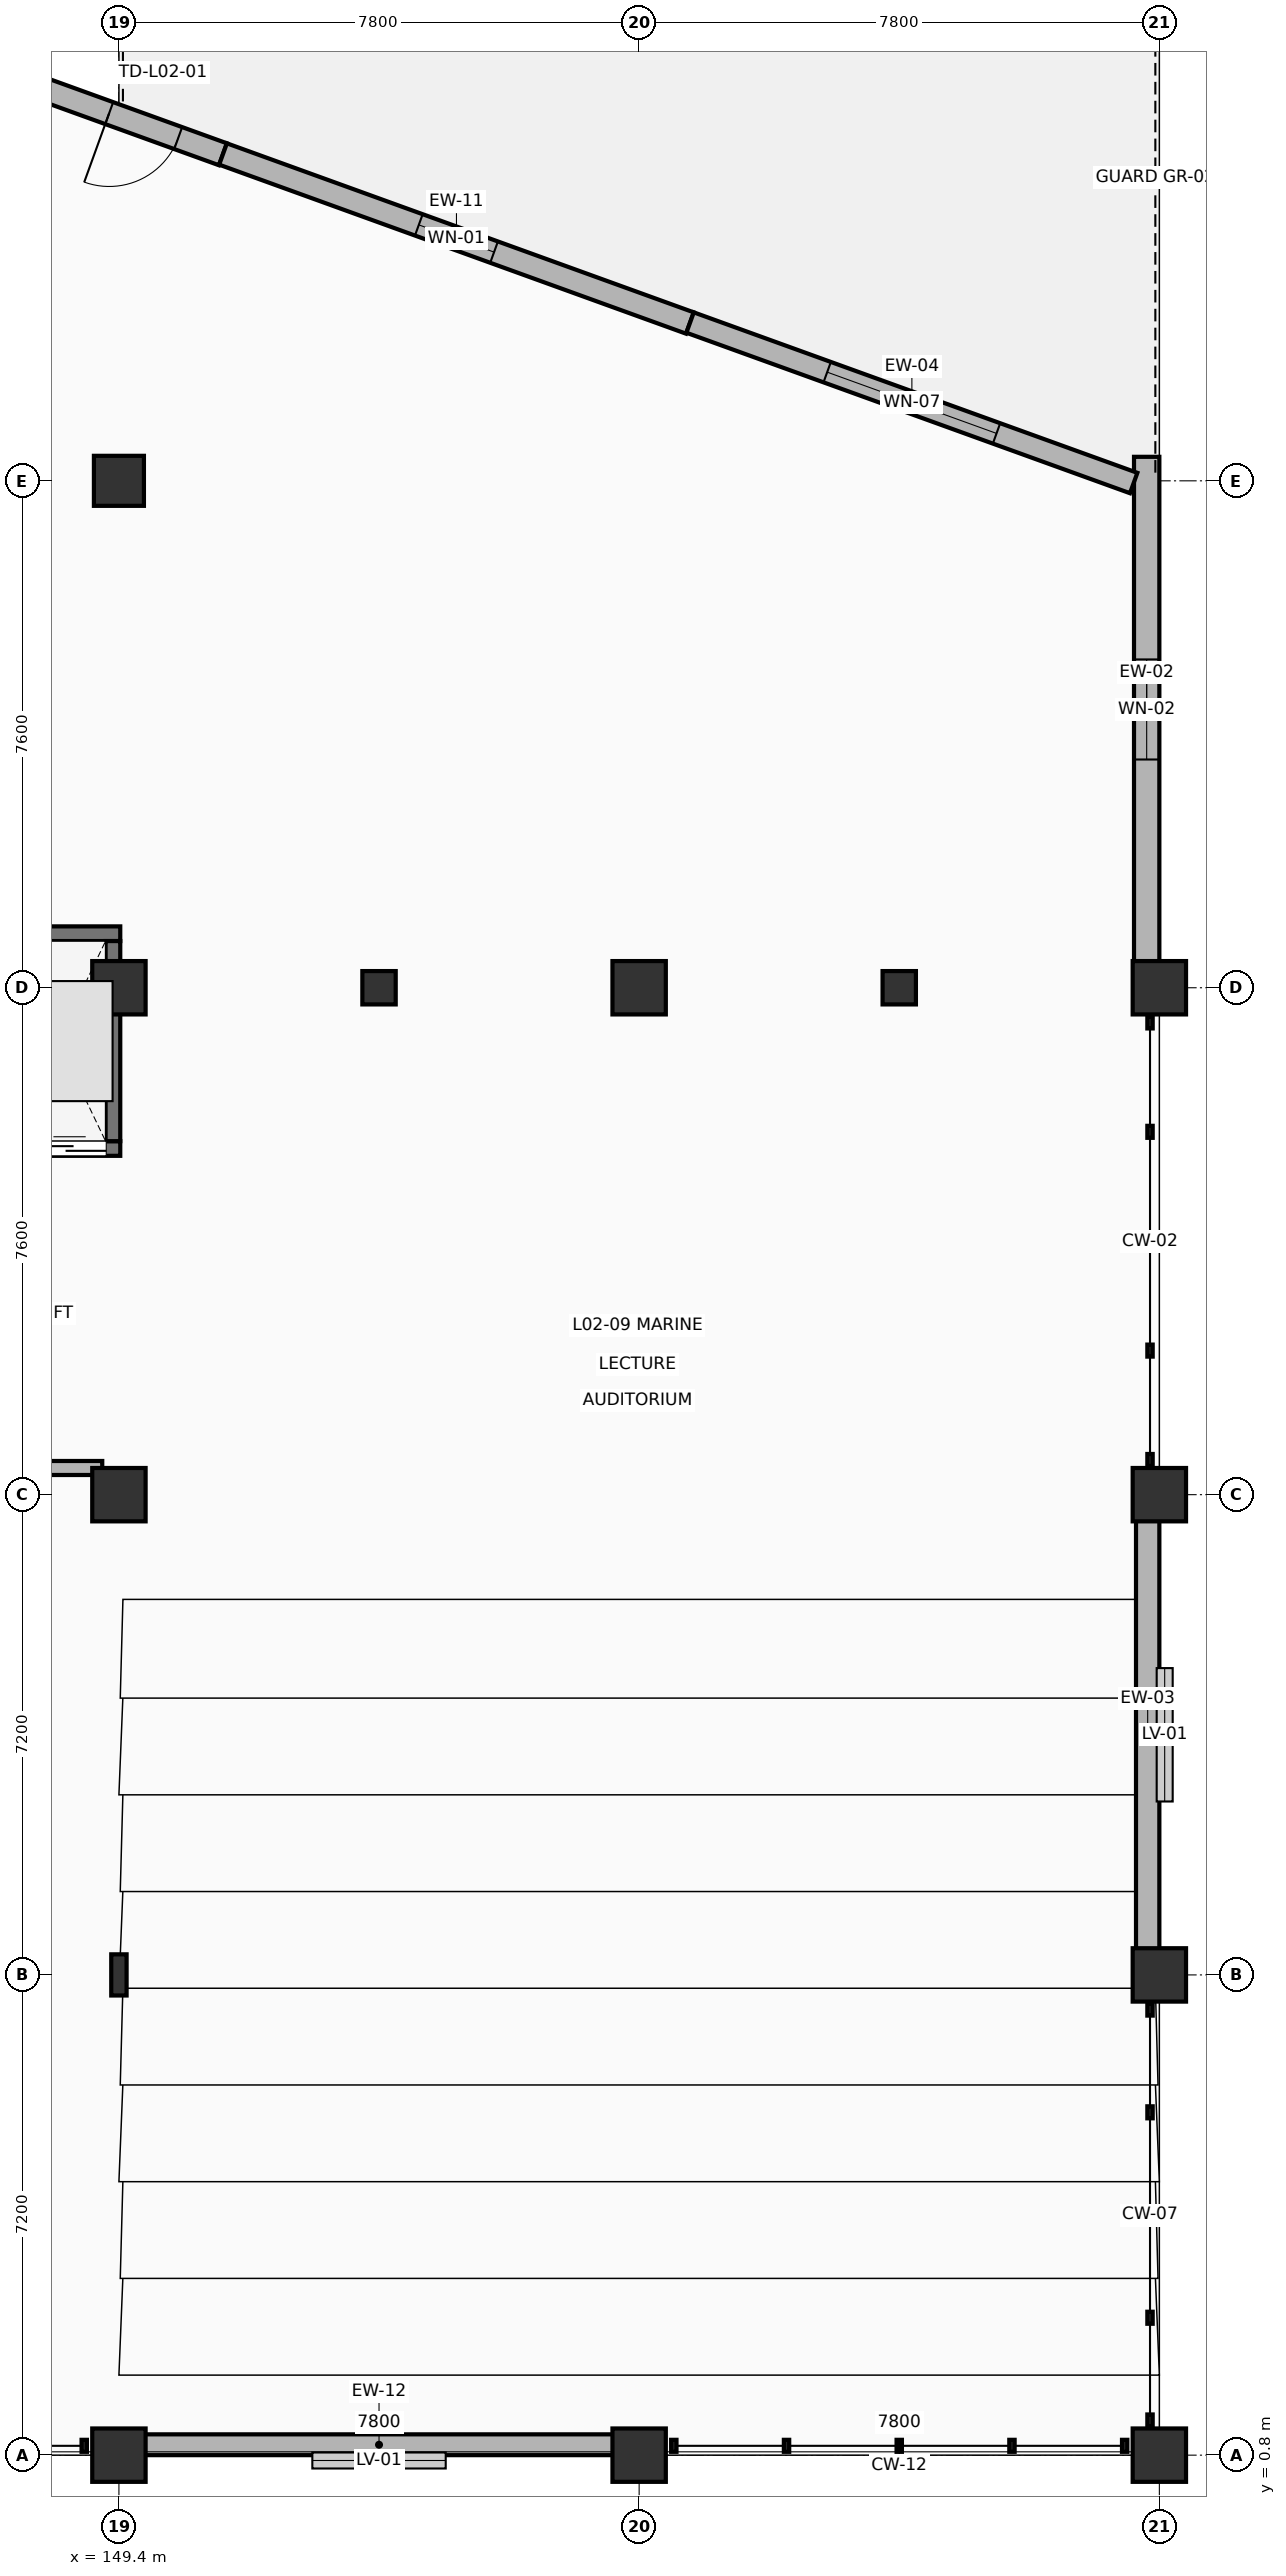
"""IFC4 building model, lengths in metres.
Left out: names, types, materials, properties, quantities, classifications, styles, units other than length and angle.
Written with IfcOpenShell. Run it as: python <this file> out.ifc"""

import sys

from ifc_helpers import new_model, si_unit, direction, frame, frame_2d, origin, origin_2d, place, context, subcontext, project, spatial, rectangle, circle, i_section, extrude, element, fill, save


model = new_model("IFC4")
c1 = context("Model", 3, precision=1e-05, world=origin(), true_north=direction((0.0, 1.0)))
c2 = subcontext(c1, "Body", "Model", "MODEL_VIEW")
j1 = project(units=[si_unit("LENGTHUNIT", "METRE"), si_unit("PLANEANGLEUNIT", "RADIAN")], contexts=[c1])
p1 = place(None, origin())
s1 = spatial("IfcSite", under=j1, at=p1, CompositionType="ELEMENT")
p2 = place(p1, origin())
s2 = spatial("IfcBuilding", under=s1, at=p2, CompositionType="ELEMENT")
p3 = place(p2, frame((0.0, 0.0, 5.4)))
s3 = spatial("IfcBuildingStorey", under=s2, at=p3, CompositionType="ELEMENT", Elevation=5.4)
p4 = place(p3, frame((149.4, 0.8, 0.0), z_axis=(0.0, 0.0, 1.0), x_axis=(1.0, 0.0, 0.0)))
e1 = element("IfcColumn", 1, at=p4, inside=s3, PredefinedType="COLUMN", context=c2, shape_type="SweptSolid", body=[
    extrude(rectangle(XDim=0.8, YDim=0.8, at=origin_2d()), origin(), (0.0, 0.0, 1.0), 4.84),
])
p5 = place(p3, frame((149.4, 8.0, 0.0), z_axis=(0.0, 0.0, 1.0), x_axis=(1.0, 0.0, 0.0)))
e2 = element("IfcColumn", 2, at=p5, inside=s3, PredefinedType="COLUMN", context=c2, shape_type="SweptSolid", body=[
    extrude(i_section(OverallWidth=0.23, OverallDepth=0.617, WebThickness=0.013, FlangeThickness=0.022, at=origin_2d()), origin(), (0.0, 0.0, 1.0), 5.1),
])
for number, where, z_axis, x_axis in (
    (3, (149.4, 15.2, 0.0), (0.0, 0.0, 1.0), (1.0, 0.0, 0.0)),
    (4, (149.4, 22.8, 0.0), (0.0, 0.0, 1.0), (1.0, 0.0, 0.0)),
):
    element("IfcColumn", number, at=place(p3, frame(where, z_axis=z_axis, x_axis=x_axis)), inside=s3, PredefinedType="COLUMN", context=c2, shape_type="SweptSolid", body=[
        extrude(rectangle(XDim=0.8, YDim=0.8, at=origin_2d()), origin(), (0.0, 0.0, 1.0), 5.1),
    ])
p6 = place(p3, frame((149.4, 30.4, 0.0), z_axis=(0.0, 0.0, 1.0), x_axis=(1.0, 0.0, 0.0)))
e5 = element("IfcColumn", 5, at=p6, inside=s3, PredefinedType="COLUMN", context=c2, shape_type="SweptSolid", body=[
    extrude(circle(Radius=0.375, at=origin_2d()), origin(), (0.0, 0.0, 1.0), 4.84),
])
for number, where, z_axis, x_axis in (
    (6, (157.2, 0.8, 0.0), (0.0, 0.0, 1.0), (1.0, 0.0, 0.0)),
    (7, (157.2, 22.8, 0.0), (0.0, 0.0, 1.0), (1.0, 0.0, 0.0)),
    (8, (165.0, 0.8, 0.0), (0.0, 0.0, 1.0), (1.0, 0.0, 0.0)),
    (9, (165.0, 8.0, 0.0), (0.0, 0.0, 1.0), (1.0, 0.0, 0.0)),
    (10, (165.0, 15.2, 0.0), (0.0, 0.0, 1.0), (1.0, 0.0, 0.0)),
    (11, (165.0, 22.8, 0.0), (0.0, 0.0, 1.0), (1.0, 0.0, 0.0)),
):
    element("IfcColumn", number, at=place(p3, frame(where, z_axis=z_axis, x_axis=x_axis)), inside=s3, PredefinedType="COLUMN", context=c2, shape_type="SweptSolid", body=[
        extrude(rectangle(XDim=0.8, YDim=0.8, at=origin_2d()), origin(), (0.0, 0.0, 1.0), 4.84),
    ])
for number, where, z_axis, x_axis in (
    (12, (153.3, 22.8, 0.0), (0.0, 0.0, 1.0), (1.0, 0.0, 0.0)),
    (13, (161.1, 22.8, 0.0), (0.0, 0.0, 1.0), (1.0, 0.0, 0.0)),
):
    element("IfcColumn", number, at=place(p3, frame(where, z_axis=z_axis, x_axis=x_axis)), inside=s3, PredefinedType="COLUMN", context=c2, shape_type="SweptSolid", body=[
        extrude(rectangle(XDim=0.5, YDim=0.5, at=origin_2d()), origin(), (0.0, 0.0, 1.0), 4.84),
    ])
p7 = place(p3, frame((164.81, 30.76, 0.0), z_axis=(0.0, 0.0, 1.0), x_axis=(0.0, -1.0, 0.0)))
e14 = element("IfcWall", 14, at=p7, inside=s3, PredefinedType="SOLIDWALL", context=c2, shape_type="SweptSolid", body=[
    extrude(rectangle(XDim=7.575, YDim=0.38, at=frame_2d((3.788, 0.0))), origin(), (0.0, 0.0, 1.0), 4.86),
])
p8 = place(p7, frame((3.038, 0.0, 0.95)))
e15 = element("IfcOpeningElement", 15, at=p8, cuts=e14, PredefinedType="OPENING", context=c2, shape_type="SweptSolid", body=[
    extrude(rectangle(XDim=1.5, YDim=1.8, at=frame_2d((0.75, 0.9))), frame((0.0, 0.2, 0.0), z_axis=(0.0, -1.0, 0.0), x_axis=(1.0, 0.0, 0.0)), (0.0, 0.0, 1.0), 0.4),
])
p9 = place(p3, frame((164.825, 14.815, 0.0), z_axis=(0.0, 0.0, 1.0), x_axis=(0.0, -1.0, 0.0)))
e16 = element("IfcWall", 16, at=p9, inside=s3, PredefinedType="SOLIDWALL", context=c2, shape_type="SweptSolid", body=[
    extrude(rectangle(XDim=6.43, YDim=0.35, at=frame_2d((3.215, 0.0))), origin(), (0.0, 0.0, 1.0), 4.84),
])
p10 = place(p3, frame((156.815, 0.956, 0.0), z_axis=(0.0, 0.0, 1.0), x_axis=(-1.0, 0.0, 0.0)))
e17 = element("IfcWall", 17, at=p10, inside=s3, PredefinedType="SOLIDWALL", context=c2, shape_type="SweptSolid", body=[
    extrude(rectangle(XDim=7.03, YDim=0.312, at=frame_2d((3.515, 0.0))), origin(), (0.0, 0.0, 1.0), 4.585),
])
p11 = place(p3, frame((144.36, 37.684, 0.0), z_axis=(0.0, 0.0, 1.0), x_axis=(0.940314417114, -0.340306915839, 0.0)))
e18 = element("IfcWall", 18, at=p11, inside=s3, PredefinedType="SOLIDWALL", context=c2, shape_type="SweptSolid", body=[
    extrude(rectangle(XDim=7.018, YDim=0.35, at=frame_2d((3.509, 0.0))), origin(), (0.0, 0.0, 1.0), 4.86),
])
p12 = place(p11, frame((5.205, 0.0, 0.0)))
e19 = element("IfcOpeningElement", 19, at=p12, cuts=e18, PredefinedType="OPENING", context=c2, shape_type="SweptSolid", body=[
    extrude(rectangle(XDim=1.1, YDim=2.2, at=frame_2d((0.55, 1.1))), frame((0.0, 0.185, 0.0), z_axis=(0.0, -1.0, 0.0), x_axis=(1.0, 0.0, 0.0)), (0.0, 0.0, 1.0), 0.37),
])
p13 = place(p3, frame((150.961, 35.3, 0.0), z_axis=(0.0, 0.0, 1.0), x_axis=(0.940289377147, -0.340376096729, 0.0)))
e20 = element("IfcWall", 20, at=p13, inside=s3, PredefinedType="SOLIDWALL", context=c2, shape_type="SweptSolid", body=[
    extrude(rectangle(XDim=7.445, YDim=0.34, at=frame_2d((3.722, 0.0))), origin(), (0.0, 0.0, 1.0), 4.86),
])
p14 = place(p13, frame((3.122, 0.0, 0.95)))
e21 = element("IfcOpeningElement", 21, at=p14, cuts=e20, PredefinedType="OPENING", context=c2, shape_type="SweptSolid", body=[
    extrude(rectangle(XDim=1.2, YDim=1.8, at=frame_2d((0.6, 0.9))), frame((0.0, 0.18, 0.0), z_axis=(0.0, -1.0, 0.0), x_axis=(1.0, 0.0, 0.0)), (0.0, 0.0, 1.0), 0.36),
])
p15 = place(p3, frame((157.964, 32.773, 0.0), z_axis=(0.0, 0.0, 1.0), x_axis=(0.940359545629, -0.340182193751, 0.0)))
e22 = element("IfcWall", 22, at=p15, inside=s3, PredefinedType="SOLIDWALL", context=c2, shape_type="SweptSolid", body=[
    extrude(rectangle(XDim=7.073, YDim=0.325, at=frame_2d((3.536, 0.0))), origin(), (0.0, 0.0, 1.0), 4.86),
])
p16 = place(p15, frame((2.186, 0.0, 0.95)))
e23 = element("IfcOpeningElement", 23, at=p16, cuts=e22, PredefinedType="OPENING", context=c2, shape_type="SweptSolid", body=[
    extrude(rectangle(XDim=2.7, YDim=2.2, at=frame_2d((1.35, 1.1))), frame((0.0, 0.172, 0.0), z_axis=(0.0, -1.0, 0.0), x_axis=(1.0, 0.0, 0.0)), (0.0, 0.0, 1.0), 0.345),
])
p17 = place(p3, frame((147.9, 20.39, 0.0), z_axis=(0.0, 0.0, 1.0), x_axis=(1.0, 0.0, 0.0)))
e24 = element("IfcWall", 24, at=p17, inside=s3, PredefinedType="SHEAR", context=c2, shape_type="SweptSolid", body=[
    extrude(rectangle(XDim=1.52, YDim=0.22, at=frame_2d((0.76, 0.0))), origin(), (0.0, 0.0, 1.0), 4.84),
])
p18 = place(p17, frame((0.21, 0.0, 0.0)))
e25 = element("IfcOpeningElement", 25, at=p18, cuts=e24, PredefinedType="OPENING", context=c2, shape_type="SweptSolid", body=[
    extrude(rectangle(XDim=1.1, YDim=2.15, at=frame_2d((0.55, 1.075))), frame((0.0, 0.12, 0.0), z_axis=(0.0, -1.0, 0.0), x_axis=(1.0, 0.0, 0.0)), (0.0, 0.0, 1.0), 0.24),
])
p19 = place(p3, frame((147.9, 23.61, 0.0), z_axis=(0.0, 0.0, 1.0), x_axis=(1.0, 0.0, 0.0)))
e26 = element("IfcWall", 26, at=p19, inside=s3, PredefinedType="SHEAR", context=c2, shape_type="SweptSolid", body=[
    extrude(rectangle(XDim=1.52, YDim=0.22, at=frame_2d((0.76, 0.0))), origin(), (0.0, 0.0, 1.0), 4.84),
])
p20 = place(p3, frame((149.31, 20.5, 0.0), z_axis=(0.0, 0.0, 1.0), x_axis=(0.0, 1.0, 0.0)))
e27 = element("IfcWall", 27, at=p20, inside=s3, PredefinedType="SHEAR", context=c2, shape_type="SweptSolid", body=[
    extrude(rectangle(XDim=3.0, YDim=0.22, at=frame_2d((1.5, 0.0))), origin(), (0.0, 0.0, 1.0), 4.84),
])
p21 = place(p3, frame((141.9, 15.6, 0.0), z_axis=(0.0, 0.0, 1.0), x_axis=(1.0, 0.0, 0.0)))
e28 = element("IfcWall", 28, at=p21, inside=s3, PredefinedType="PARTITIONING", context=c2, shape_type="SweptSolid", body=[
    extrude(rectangle(XDim=7.25, YDim=0.21, at=frame_2d((3.625, 0.0))), origin(), (0.0, 0.0, 1.0), 4.84),
])
p22 = place(p21, frame((1.212, 0.0, 0.0)))
e29 = element("IfcOpeningElement", 29, at=p22, cuts=e28, PredefinedType="OPENING", context=c2, shape_type="SweptSolid", body=[
    extrude(rectangle(XDim=1.2, YDim=2.2, at=frame_2d((0.6, 1.1))), frame((0.0, 0.115, 0.0), z_axis=(0.0, -1.0, 0.0), x_axis=(1.0, 0.0, 0.0)), (0.0, 0.0, 1.0), 0.23),
])
p23 = place(p21, frame((4.838, 0.0, 0.0)))
e30 = element("IfcOpeningElement", 30, at=p23, cuts=e28, PredefinedType="OPENING", context=c2, shape_type="SweptSolid", body=[
    extrude(rectangle(XDim=1.2, YDim=2.2, at=frame_2d((0.6, 1.1))), frame((0.0, 0.115, 0.0), z_axis=(0.0, -1.0, 0.0), x_axis=(1.0, 0.0, 0.0)), (0.0, 0.0, 1.0), 0.23),
])
p24 = place(p12, origin())
e31 = element("IfcDoor", 31, at=p24, inside=s3, OperationType="SINGLE_SWING_RIGHT", PredefinedType="DOOR", context=c2, shape_type="SweptSolid", body=[
    extrude(rectangle(XDim=1.1, YDim=2.2, at=frame_2d((0.55, 1.1))), frame((0.0, 0.025, 0.0), z_axis=(0.0, -1.0, 0.0), x_axis=(1.0, 0.0, 0.0)), (0.0, 0.0, 1.0), 0.05),
])
fill(e19, e31)
p25 = place(p8, origin())
e32 = element("IfcWindow", 32, at=p25, inside=s3, PartitioningType="SINGLE_PANEL", PredefinedType="WINDOW", context=c2, shape_type="SweptSolid", body=[
    extrude(rectangle(XDim=1.5, YDim=1.8, at=frame_2d((0.75, 0.9))), frame((0.0, 0.03, 0.0), z_axis=(0.0, -1.0, 0.0), x_axis=(1.0, 0.0, 0.0)), (0.0, 0.0, 1.0), 0.06),
])
fill(e15, e32)
p26 = place(p14, origin())
e33 = element("IfcWindow", 33, at=p26, inside=s3, PartitioningType="SINGLE_PANEL", PredefinedType="WINDOW", context=c2, shape_type="SweptSolid", body=[
    extrude(rectangle(XDim=1.2, YDim=1.8, at=frame_2d((0.6, 0.9))), frame((0.0, 0.03, 0.0), z_axis=(0.0, -1.0, 0.0), x_axis=(1.0, 0.0, 0.0)), (0.0, 0.0, 1.0), 0.06),
])
fill(e21, e33)
p27 = place(p16, origin())
e34 = element("IfcWindow", 34, at=p27, inside=s3, PartitioningType="SINGLE_PANEL", PredefinedType="WINDOW", context=c2, shape_type="SweptSolid", body=[
    extrude(rectangle(XDim=2.7, YDim=2.2, at=frame_2d((1.35, 1.1))), frame((0.0, 0.03, 0.0), z_axis=(0.0, -1.0, 0.0), x_axis=(1.0, 0.0, 0.0)), (0.0, 0.0, 1.0), 0.06),
])
fill(e23, e34)
p28 = place(p18, origin())
e35 = element("IfcDoor", 35, at=p28, inside=s3, OperationType="DOUBLE_DOOR_SLIDING", PredefinedType="DOOR", context=c2, shape_type="SweptSolid", body=[
    extrude(rectangle(XDim=1.1, YDim=2.15, at=frame_2d((0.55, 1.075))), frame((0.0, 0.025, 0.0), z_axis=(0.0, -1.0, 0.0), x_axis=(1.0, 0.0, 0.0)), (0.0, 0.0, 1.0), 0.05),
])
fill(e25, e35)
save(model, sys.argv[1])
